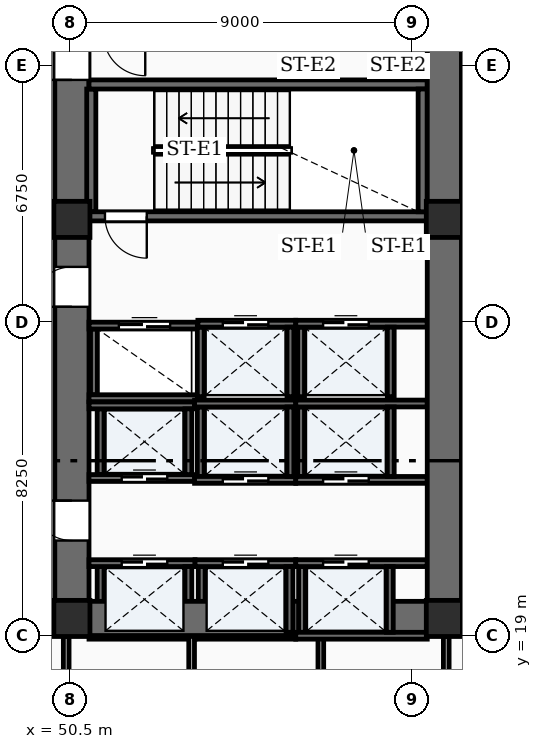
"""IFC4 building model, lengths in metres.
Left out: names, types, materials, properties, quantities, classifications, styles, units other than length and angle.
Written with IfcOpenShell. Run it as: python <this file> out.ifc"""

import sys

from ifc_helpers import new_model, si_unit, direction, frame, frame_2d, origin, origin_2d, place, context, subcontext, project, spatial, rectangle, extrude, element, fill, save


model = new_model("IFC4")
c1 = context("Model", 3, precision=1e-05, world=origin(), true_north=direction((0.0, 1.0)))
c2 = subcontext(c1, "Body", "Model", "MODEL_VIEW")
j1 = project(units=[si_unit("LENGTHUNIT", "METRE"), si_unit("PLANEANGLEUNIT", "RADIAN")], contexts=[c1])
p1 = place(None, origin())
s1 = spatial("IfcSite", under=j1, at=p1, CompositionType="ELEMENT")
p2 = place(p1, origin())
s2 = spatial("IfcBuilding", under=s1, at=p2, CompositionType="ELEMENT")
p3 = place(p2, origin())
s3 = spatial("IfcBuildingStorey", under=s2, at=p3, CompositionType="ELEMENT", Elevation=0.0)
p4 = place(p3, frame((50.55, 19.0, -0.45), z_axis=(0.0, 0.0, 1.0), x_axis=(0.0, 1.0, 0.0)))
e1 = element("IfcWall", 1, at=p4, inside=s3, PredefinedType="SHEAR", context=c2, shape_type="SweptSolid", body=[
    extrude(rectangle(XDim=20.8, YDim=0.9, at=frame_2d((10.4, 0.0))), origin(), (0.0, 0.0, 1.0), 8.1),
])
p5 = place(p4, frame((2.5, 0.0, 0.45)))
e2 = element("IfcOpeningElement", 2, at=p5, cuts=e1, PredefinedType="OPENING", context=c2, shape_type="SweptSolid", body=[
    extrude(rectangle(XDim=1.05, YDim=2.15, at=frame_2d((0.525, 1.075))), frame((0.0, 0.46, 0.0), z_axis=(0.0, -1.0, 0.0), x_axis=(1.0, 0.0, 0.0)), (0.0, 0.0, 1.0), 0.92),
])
p6 = place(p4, frame((8.65, 0.0, 0.45)))
e3 = element("IfcOpeningElement", 3, at=p6, cuts=e1, PredefinedType="OPENING", context=c2, shape_type="SweptSolid", body=[
    extrude(rectangle(XDim=1.05, YDim=2.15, at=frame_2d((0.525, 1.075))), frame((0.0, 0.46, 0.0), z_axis=(0.0, -1.0, 0.0), x_axis=(1.0, 0.0, 0.0)), (0.0, 0.0, 1.0), 0.92),
])
p7 = place(p4, frame((14.62, 0.0, 0.45)))
e4 = element("IfcOpeningElement", 4, at=p7, cuts=e1, PredefinedType="OPENING", context=c2, shape_type="SweptSolid", body=[
    extrude(rectangle(XDim=1.1, YDim=2.15, at=frame_2d((0.55, 1.075))), frame((0.0, 0.46, 0.0), z_axis=(0.0, -1.0, 0.0), x_axis=(1.0, 0.0, 0.0)), (0.0, 0.0, 1.0), 0.92),
])
p8 = place(p3, frame((60.35, 19.0, -0.45), z_axis=(0.0, 0.0, 1.0), x_axis=(0.0, 1.0, 0.0)))
e5 = element("IfcWall", 5, at=p8, inside=s3, PredefinedType="SHEAR", context=c2, shape_type="SweptSolid", body=[
    extrude(rectangle(XDim=20.8, YDim=0.9, at=frame_2d((10.4, 0.0))), origin(), (0.0, 0.0, 1.0), 8.1),
])
p9 = place(p3, frame((51.0, 19.45, -0.45), z_axis=(0.0, 0.0, 1.0), x_axis=(1.0, 0.0, 0.0)))
e6 = element("IfcWall", 6, at=p9, inside=s3, PredefinedType="SHEAR", context=c2, shape_type="SweptSolid", body=[
    extrude(rectangle(XDim=8.9, YDim=0.9, at=frame_2d((4.45, 0.0))), origin(), (0.0, 0.0, 1.0), 8.1),
])
for number, where, z_axis, x_axis in (
    (7, (50.55, 19.45, -0.45), (0.0, 0.0, 1.0), (1.0, 0.0, 0.0)),
    (8, (60.35, 19.45, -0.45), (0.0, 0.0, 1.0), (1.0, 0.0, 0.0)),
    (9, (50.55, 29.95, -0.45), (0.0, 0.0, 1.0), (1.0, 0.0, 0.0)),
    (10, (60.35, 29.95, -0.45), (0.0, 0.0, 1.0), (1.0, 0.0, 0.0)),
):
    element("IfcColumn", number, at=place(p3, frame(where, z_axis=z_axis, x_axis=x_axis)), inside=s3, PredefinedType="COLUMN", context=c2, shape_type="SweptSolid", body=[
        extrude(rectangle(XDim=0.95, YDim=0.95, at=origin_2d()), origin(), (0.0, 0.0, 1.0), 8.1),
    ])
p10 = place(p3, frame((59.9, 30.03, 0.0), z_axis=(0.0, 0.0, 1.0), x_axis=(-1.0, 0.0, 0.0)))
e11 = element("IfcWall", 11, at=p10, inside=s3, PredefinedType="SOLIDWALL", context=c2, shape_type="SweptSolid", body=[
    extrude(rectangle(XDim=8.9, YDim=0.24, at=frame_2d((4.45, 0.0))), origin(), (0.0, 0.0, 1.0), 7.65),
])
p11 = place(p10, frame((7.38, 0.0, 0.0)))
e12 = element("IfcOpeningElement", 12, at=p11, cuts=e11, PredefinedType="OPENING", context=c2, shape_type="SweptSolid", body=[
    extrude(rectangle(XDim=1.1, YDim=2.15, at=frame_2d((0.55, 1.075))), frame((0.0, 0.13, 0.0), z_axis=(0.0, -1.0, 0.0), x_axis=(1.0, 0.0, 0.0)), (0.0, 0.0, 1.0), 0.26),
])
p12 = place(p3, frame((51.0, 33.5, 0.0), z_axis=(0.0, 0.0, 1.0), x_axis=(1.0, 0.0, 0.0)))
e13 = element("IfcWall", 13, at=p12, inside=s3, PredefinedType="SOLIDWALL", context=c2, shape_type="SweptSolid", body=[
    extrude(rectangle(XDim=8.9, YDim=0.24, at=frame_2d((4.45, 0.0))), origin(), (0.0, 0.0, 1.0), 7.65),
])
for number, where, z_axis, x_axis in (
    (14, (51.06, 30.15, 0.0), (0.0, 0.0, 1.0), (0.0, 1.0, 0.0)),
    (15, (59.78, 30.15, 0.0), (0.0, 0.0, 1.0), (0.0, 1.0, 0.0)),
):
    element("IfcWall", number, at=place(p3, frame(where, z_axis=z_axis, x_axis=x_axis)), inside=s3, PredefinedType="SOLIDWALL", context=c2, shape_type="SweptSolid", body=[
        extrude(rectangle(XDim=3.23, YDim=0.24, at=frame_2d((1.615, 0.0))), origin(), (0.0, 0.0, 1.0), 7.65),
    ])
p13 = place(p3, frame((51.0, 20.905, 0.0), z_axis=(0.0, 0.0, 1.0), x_axis=(1.0, 0.0, 0.0)))
e16 = element("IfcWall", 16, at=p13, inside=s3, PredefinedType="SOLIDWALL", context=c2, shape_type="SweptSolid", body=[
    extrude(rectangle(XDim=2.79, YDim=0.18, at=frame_2d((1.395, 0.0))), origin(), (0.0, 0.0, 1.0), 7.65),
])
p14 = place(p13, frame((0.86, 0.0, 0.0)))
e17 = element("IfcOpeningElement", 17, at=p14, cuts=e16, PredefinedType="OPENING", context=c2, shape_type="SweptSolid", body=[
    extrude(rectangle(XDim=1.2, YDim=2.2, at=frame_2d((0.6, 1.1))), frame((0.0, 0.1, 0.0), z_axis=(0.0, -1.0, 0.0), x_axis=(1.0, 0.0, 0.0)), (0.0, 0.0, 1.0), 0.2),
])
p15 = place(p3, frame((51.0, 18.995, 0.0), z_axis=(0.0, 0.0, 1.0), x_axis=(1.0, 0.0, 0.0)))
e18 = element("IfcWall", 18, at=p15, inside=s3, PredefinedType="SOLIDWALL", context=c2, shape_type="SweptSolid", body=[
    extrude(rectangle(XDim=2.79, YDim=0.18, at=frame_2d((1.395, 0.0))), origin(), (0.0, 0.0, 1.0), 7.65),
])
for number, where, z_axis, x_axis in (
    (19, (51.305, 19.085, 0.0), (0.0, 0.0, 1.0), (0.0, 1.0, 0.0)),
    (20, (53.615, 19.085, 0.0), (0.0, 0.0, 1.0), (0.0, 1.0, 0.0)),
):
    element("IfcWall", number, at=place(p3, frame(where, z_axis=z_axis, x_axis=x_axis)), inside=s3, PredefinedType="SOLIDWALL", context=c2, shape_type="SweptSolid", body=[
        extrude(rectangle(XDim=1.73, YDim=0.18, at=frame_2d((0.865, 0.0))), origin(), (0.0, 0.0, 1.0), 7.65),
    ])
p16 = place(p3, frame((53.79, 20.905, 0.0), z_axis=(0.0, 0.0, 1.0), x_axis=(1.0, 0.0, 0.0)))
e21 = element("IfcWall", 21, at=p16, inside=s3, PredefinedType="SOLIDWALL", context=c2, shape_type="SweptSolid", body=[
    extrude(rectangle(XDim=2.65, YDim=0.18, at=frame_2d((1.325, 0.0))), origin(), (0.0, 0.0, 1.0), 7.65),
])
p17 = place(p16, frame((0.73, 0.0, 0.0)))
e22 = element("IfcOpeningElement", 22, at=p17, cuts=e21, PredefinedType="OPENING", context=c2, shape_type="SweptSolid", body=[
    extrude(rectangle(XDim=1.2, YDim=2.2, at=frame_2d((0.6, 1.1))), frame((0.0, 0.1, 0.0), z_axis=(0.0, -1.0, 0.0), x_axis=(1.0, 0.0, 0.0)), (0.0, 0.0, 1.0), 0.2),
])
p18 = place(p3, frame((53.79, 18.995, 0.0), z_axis=(0.0, 0.0, 1.0), x_axis=(1.0, 0.0, 0.0)))
e23 = element("IfcWall", 23, at=p18, inside=s3, PredefinedType="SOLIDWALL", context=c2, shape_type="SweptSolid", body=[
    extrude(rectangle(XDim=2.65, YDim=0.18, at=frame_2d((1.325, 0.0))), origin(), (0.0, 0.0, 1.0), 7.65),
])
for number, where, z_axis, x_axis in (
    (24, (53.965, 19.085, 0.0), (0.0, 0.0, 1.0), (0.0, 1.0, 0.0)),
    (25, (56.275, 19.085, 0.0), (0.0, 0.0, 1.0), (0.0, 1.0, 0.0)),
):
    element("IfcWall", number, at=place(p3, frame(where, z_axis=z_axis, x_axis=x_axis)), inside=s3, PredefinedType="SOLIDWALL", context=c2, shape_type="SweptSolid", body=[
        extrude(rectangle(XDim=1.73, YDim=0.18, at=frame_2d((0.865, 0.0))), origin(), (0.0, 0.0, 1.0), 7.65),
    ])
p19 = place(p3, frame((56.44, 20.905, 0.0), z_axis=(0.0, 0.0, 1.0), x_axis=(1.0, 0.0, 0.0)))
e26 = element("IfcWall", 26, at=p19, inside=s3, PredefinedType="SOLIDWALL", context=c2, shape_type="SweptSolid", body=[
    extrude(rectangle(XDim=3.46, YDim=0.18, at=frame_2d((1.73, 0.0))), origin(), (0.0, 0.0, 1.0), 7.65),
])
p20 = place(p19, frame((0.72, 0.0, 0.0)))
e27 = element("IfcOpeningElement", 27, at=p20, cuts=e26, PredefinedType="OPENING", context=c2, shape_type="SweptSolid", body=[
    extrude(rectangle(XDim=1.2, YDim=2.2, at=frame_2d((0.6, 1.1))), frame((0.0, 0.1, 0.0), z_axis=(0.0, -1.0, 0.0), x_axis=(1.0, 0.0, 0.0)), (0.0, 0.0, 1.0), 0.2),
])
p21 = place(p3, frame((56.44, 18.995, 0.0), z_axis=(0.0, 0.0, 1.0), x_axis=(1.0, 0.0, 0.0)))
e28 = element("IfcWall", 28, at=p21, inside=s3, PredefinedType="SOLIDWALL", context=c2, shape_type="SweptSolid", body=[
    extrude(rectangle(XDim=3.46, YDim=0.18, at=frame_2d((1.73, 0.0))), origin(), (0.0, 0.0, 1.0), 7.65),
])
for number, where, z_axis, x_axis in (
    (29, (56.605, 19.085, 0.0), (0.0, 0.0, 1.0), (0.0, 1.0, 0.0)),
    (30, (58.915, 19.085, 0.0), (0.0, 0.0, 1.0), (0.0, 1.0, 0.0)),
):
    element("IfcWall", number, at=place(p3, frame(where, z_axis=z_axis, x_axis=x_axis)), inside=s3, PredefinedType="SOLIDWALL", context=c2, shape_type="SweptSolid", body=[
        extrude(rectangle(XDim=1.73, YDim=0.18, at=frame_2d((0.865, 0.0))), origin(), (0.0, 0.0, 1.0), 7.65),
    ])
p22 = place(p3, frame((51.0, 25.055, 0.0), z_axis=(0.0, 0.0, 1.0), x_axis=(1.0, 0.0, 0.0)))
e31 = element("IfcWall", 31, at=p22, inside=s3, PredefinedType="SOLIDWALL", context=c2, shape_type="SweptSolid", body=[
    extrude(rectangle(XDim=2.778, YDim=0.18, at=frame_2d((1.389, 0.0))), origin(), (0.0, 0.0, 1.0), 7.65),
])
p23 = place(p3, frame((51.0, 23.145, 0.0), z_axis=(0.0, 0.0, 1.0), x_axis=(1.0, 0.0, 0.0)))
e32 = element("IfcWall", 32, at=p23, inside=s3, PredefinedType="SOLIDWALL", context=c2, shape_type="SweptSolid", body=[
    extrude(rectangle(XDim=2.778, YDim=0.18, at=frame_2d((1.389, 0.0))), origin(), (0.0, 0.0, 1.0), 7.65),
])
p24 = place(p23, frame((0.86, 0.0, 0.0)))
e33 = element("IfcOpeningElement", 33, at=p24, cuts=e32, PredefinedType="OPENING", context=c2, shape_type="SweptSolid", body=[
    extrude(rectangle(XDim=1.2, YDim=2.2, at=frame_2d((0.6, 1.1))), frame((0.0, 0.1, 0.0), z_axis=(0.0, -1.0, 0.0), x_axis=(1.0, 0.0, 0.0)), (0.0, 0.0, 1.0), 0.2),
])
for number, where, z_axis, x_axis in (
    (34, (51.305, 23.235, 0.0), (0.0, 0.0, 1.0), (0.0, 1.0, 0.0)),
    (35, (53.615, 23.235, 0.0), (0.0, 0.0, 1.0), (0.0, 1.0, 0.0)),
):
    element("IfcWall", number, at=place(p3, frame(where, z_axis=z_axis, x_axis=x_axis)), inside=s3, PredefinedType="SOLIDWALL", context=c2, shape_type="SweptSolid", body=[
        extrude(rectangle(XDim=1.73, YDim=0.18, at=frame_2d((0.865, 0.0))), origin(), (0.0, 0.0, 1.0), 7.65),
    ])
p25 = place(p3, frame((53.778, 25.105, 0.0), z_axis=(0.0, 0.0, 1.0), x_axis=(1.0, 0.0, 0.0)))
e36 = element("IfcWall", 36, at=p25, inside=s3, PredefinedType="SOLIDWALL", context=c2, shape_type="SweptSolid", body=[
    extrude(rectangle(XDim=2.662, YDim=0.18, at=frame_2d((1.331, 0.0))), origin(), (0.0, 0.0, 1.0), 7.65),
])
p26 = place(p3, frame((53.778, 23.095, 0.0), z_axis=(0.0, 0.0, 1.0), x_axis=(1.0, 0.0, 0.0)))
e37 = element("IfcWall", 37, at=p26, inside=s3, PredefinedType="SOLIDWALL", context=c2, shape_type="SweptSolid", body=[
    extrude(rectangle(XDim=2.662, YDim=0.18, at=frame_2d((1.331, 0.0))), origin(), (0.0, 0.0, 1.0), 7.65),
])
p27 = place(p26, frame((0.742, 0.0, 0.0)))
e38 = element("IfcOpeningElement", 38, at=p27, cuts=e37, PredefinedType="OPENING", context=c2, shape_type="SweptSolid", body=[
    extrude(rectangle(XDim=1.2, YDim=2.2, at=frame_2d((0.6, 1.1))), frame((0.0, 0.1, 0.0), z_axis=(0.0, -1.0, 0.0), x_axis=(1.0, 0.0, 0.0)), (0.0, 0.0, 1.0), 0.2),
])
for number, where, z_axis, x_axis in (
    (39, (53.94, 23.185, 0.0), (0.0, 0.0, 1.0), (0.0, 1.0, 0.0)),
    (40, (56.3, 23.185, 0.0), (0.0, 0.0, 1.0), (0.0, 1.0, 0.0)),
):
    element("IfcWall", number, at=place(p3, frame(where, z_axis=z_axis, x_axis=x_axis)), inside=s3, PredefinedType="SOLIDWALL", context=c2, shape_type="SweptSolid", body=[
        extrude(rectangle(XDim=1.83, YDim=0.18, at=frame_2d((0.915, 0.0))), origin(), (0.0, 0.0, 1.0), 7.65),
    ])
p28 = place(p3, frame((56.44, 25.105, 0.0), z_axis=(0.0, 0.0, 1.0), x_axis=(1.0, 0.0, 0.0)))
e41 = element("IfcWall", 41, at=p28, inside=s3, PredefinedType="SOLIDWALL", context=c2, shape_type="SweptSolid", body=[
    extrude(rectangle(XDim=3.46, YDim=0.18, at=frame_2d((1.73, 0.0))), origin(), (0.0, 0.0, 1.0), 7.65),
])
p29 = place(p3, frame((56.44, 23.095, 0.0), z_axis=(0.0, 0.0, 1.0), x_axis=(1.0, 0.0, 0.0)))
e42 = element("IfcWall", 42, at=p29, inside=s3, PredefinedType="SOLIDWALL", context=c2, shape_type="SweptSolid", body=[
    extrude(rectangle(XDim=3.46, YDim=0.18, at=frame_2d((1.73, 0.0))), origin(), (0.0, 0.0, 1.0), 7.65),
])
p30 = place(p29, frame((0.72, 0.0, 0.0)))
e43 = element("IfcOpeningElement", 43, at=p30, cuts=e42, PredefinedType="OPENING", context=c2, shape_type="SweptSolid", body=[
    extrude(rectangle(XDim=1.2, YDim=2.2, at=frame_2d((0.6, 1.1))), frame((0.0, 0.1, 0.0), z_axis=(0.0, -1.0, 0.0), x_axis=(1.0, 0.0, 0.0)), (0.0, 0.0, 1.0), 0.2),
])
for number, where, z_axis, x_axis in (
    (44, (56.58, 23.185, 0.0), (0.0, 0.0, 1.0), (0.0, 1.0, 0.0)),
    (45, (58.94, 23.185, 0.0), (0.0, 0.0, 1.0), (0.0, 1.0, 0.0)),
):
    element("IfcWall", number, at=place(p3, frame(where, z_axis=z_axis, x_axis=x_axis)), inside=s3, PredefinedType="SOLIDWALL", context=c2, shape_type="SweptSolid", body=[
        extrude(rectangle(XDim=1.83, YDim=0.18, at=frame_2d((0.915, 0.0))), origin(), (0.0, 0.0, 1.0), 7.65),
    ])
p31 = place(p3, frame((53.865, 27.205, 0.0), z_axis=(0.0, 0.0, 1.0), x_axis=(1.0, 0.0, 0.0)))
e46 = element("IfcWall", 46, at=p31, inside=s3, PredefinedType="SOLIDWALL", context=c2, shape_type="SweptSolid", body=[
    extrude(rectangle(XDim=2.575, YDim=0.18, at=frame_2d((1.288, 0.0))), origin(), (0.0, 0.0, 1.0), 7.65),
])
p32 = place(p31, frame((0.655, 0.0, 0.0)))
e47 = element("IfcOpeningElement", 47, at=p32, cuts=e46, PredefinedType="OPENING", context=c2, shape_type="SweptSolid", body=[
    extrude(rectangle(XDim=1.2, YDim=2.2, at=frame_2d((0.6, 1.1))), frame((0.0, 0.1, 0.0), z_axis=(0.0, -1.0, 0.0), x_axis=(1.0, 0.0, 0.0)), (0.0, 0.0, 1.0), 0.2),
])
for number, where, z_axis, x_axis in (
    (48, (53.94, 25.285, 0.0), (0.0, 0.0, 1.0), (0.0, 1.0, 0.0)),
    (49, (56.3, 25.285, 0.0), (0.0, 0.0, 1.0), (0.0, 1.0, 0.0)),
):
    element("IfcWall", number, at=place(p3, frame(where, z_axis=z_axis, x_axis=x_axis)), inside=s3, PredefinedType="SOLIDWALL", context=c2, shape_type="SweptSolid", body=[
        extrude(rectangle(XDim=1.83, YDim=0.18, at=frame_2d((0.915, 0.0))), origin(), (0.0, 0.0, 1.0), 7.65),
    ])
p33 = place(p3, frame((56.44, 27.205, 0.0), z_axis=(0.0, 0.0, 1.0), x_axis=(1.0, 0.0, 0.0)))
e50 = element("IfcWall", 50, at=p33, inside=s3, PredefinedType="SOLIDWALL", context=c2, shape_type="SweptSolid", body=[
    extrude(rectangle(XDim=3.46, YDim=0.18, at=frame_2d((1.73, 0.0))), origin(), (0.0, 0.0, 1.0), 7.65),
])
p34 = place(p33, frame((0.72, 0.0, 0.0)))
e51 = element("IfcOpeningElement", 51, at=p34, cuts=e50, PredefinedType="OPENING", context=c2, shape_type="SweptSolid", body=[
    extrude(rectangle(XDim=1.2, YDim=2.2, at=frame_2d((0.6, 1.1))), frame((0.0, 0.1, 0.0), z_axis=(0.0, -1.0, 0.0), x_axis=(1.0, 0.0, 0.0)), (0.0, 0.0, 1.0), 0.2),
])
for number, where, z_axis, x_axis in (
    (52, (56.58, 25.285, 0.0), (0.0, 0.0, 1.0), (0.0, 1.0, 0.0)),
    (53, (58.94, 25.285, 0.0), (0.0, 0.0, 1.0), (0.0, 1.0, 0.0)),
):
    element("IfcWall", number, at=place(p3, frame(where, z_axis=z_axis, x_axis=x_axis)), inside=s3, PredefinedType="SOLIDWALL", context=c2, shape_type="SweptSolid", body=[
        extrude(rectangle(XDim=1.83, YDim=0.18, at=frame_2d((0.915, 0.0))), origin(), (0.0, 0.0, 1.0), 7.65),
    ])
p35 = place(p3, frame((51.0, 27.155, 0.0), z_axis=(0.0, 0.0, 1.0), x_axis=(1.0, 0.0, 0.0)))
e54 = element("IfcWall", 54, at=p35, inside=s3, PredefinedType="SOLIDWALL", context=c2, shape_type="SweptSolid", body=[
    extrude(rectangle(XDim=2.865, YDim=0.18, at=frame_2d((1.433, 0.0))), origin(), (0.0, 0.0, 1.0), 7.65),
])
p36 = place(p35, frame((0.785, 0.0, 0.0)))
e55 = element("IfcOpeningElement", 55, at=p36, cuts=e54, PredefinedType="OPENING", context=c2, shape_type="SweptSolid", body=[
    extrude(rectangle(XDim=1.35, YDim=2.3, at=frame_2d((0.675, 1.15))), frame((0.0, 0.1, 0.0), z_axis=(0.0, -1.0, 0.0), x_axis=(1.0, 0.0, 0.0)), (0.0, 0.0, 1.0), 0.2),
])
p37 = place(p3, frame((51.0, 25.245, 0.0), z_axis=(0.0, 0.0, 1.0), x_axis=(1.0, 0.0, 0.0)))
e56 = element("IfcWall", 56, at=p37, inside=s3, PredefinedType="SOLIDWALL", context=c2, shape_type="SweptSolid", body=[
    extrude(rectangle(XDim=2.865, YDim=0.18, at=frame_2d((1.433, 0.0))), origin(), (0.0, 0.0, 1.0), 7.65),
])
p38 = place(p3, frame((51.13, 25.335, 0.0), z_axis=(0.0, 0.0, 1.0), x_axis=(0.0, 1.0, 0.0)))
e57 = element("IfcWall", 57, at=p38, inside=s3, PredefinedType="SOLIDWALL", context=c2, shape_type="SweptSolid", body=[
    extrude(rectangle(XDim=1.73, YDim=0.18, at=frame_2d((0.865, 0.0))), origin(), (0.0, 0.0, 1.0), 7.65),
])
for number, where, z_axis, x_axis in (
    (58, (53.7, 15.4, 0.0), (0.0, 0.0, 1.0), (0.0, 1.0, 0.0)),
    (59, (57.1, 15.4, 0.0), (0.0, 0.0, 1.0), (0.0, 1.0, 0.0)),
    (60, (50.4, 15.4, 0.0), (0.0, 0.0, 1.0), (0.0, 1.0, 0.0)),
    (61, (60.4, 15.4, 0.0), (0.0, 0.0, 1.0), (0.0, 1.0, 0.0)),
):
    element("IfcWall", number, at=place(p3, frame(where, z_axis=z_axis, x_axis=x_axis)), inside=s3, PredefinedType="PARTITIONING", context=c2, shape_type="SweptSolid", body=[
        extrude(rectangle(XDim=3.58, YDim=0.15, at=frame_2d((1.79, 0.0))), origin(), (0.0, 0.0, 1.0), 6.71),
    ])
p39 = place(p5, origin())
e62 = element("IfcDoor", 62, at=p39, inside=s3, OperationType="SINGLE_SWING_RIGHT", PredefinedType="DOOR", context=c2, shape_type="SweptSolid", body=[
    extrude(rectangle(XDim=1.05, YDim=2.15, at=frame_2d((0.525, 1.075))), frame((0.0, 0.025, 0.0), z_axis=(0.0, -1.0, 0.0), x_axis=(1.0, 0.0, 0.0)), (0.0, 0.0, 1.0), 0.05),
])
fill(e2, e62)
p40 = place(p6, origin())
e63 = element("IfcDoor", 63, at=p40, inside=s3, OperationType="SINGLE_SWING_LEFT", PredefinedType="DOOR", context=c2, shape_type="SweptSolid", body=[
    extrude(rectangle(XDim=1.05, YDim=2.15, at=frame_2d((0.525, 1.075))), frame((0.0, 0.025, 0.0), z_axis=(0.0, -1.0, 0.0), x_axis=(1.0, 0.0, 0.0)), (0.0, 0.0, 1.0), 0.05),
])
fill(e3, e63)
p41 = place(p7, origin())
e64 = element("IfcDoor", 64, at=p41, inside=s3, OperationType="SINGLE_SWING_LEFT", PredefinedType="DOOR", context=c2, shape_type="SweptSolid", body=[
    extrude(rectangle(XDim=1.1, YDim=2.15, at=frame_2d((0.55, 1.075))), frame((0.0, 0.025, 0.0), z_axis=(0.0, -1.0, 0.0), x_axis=(1.0, 0.0, 0.0)), (0.0, 0.0, 1.0), 0.05),
])
fill(e4, e64)
p42 = place(p11, origin())
e65 = element("IfcDoor", 65, at=p42, inside=s3, OperationType="SINGLE_SWING_LEFT", PredefinedType="DOOR", context=c2, shape_type="SweptSolid", body=[
    extrude(rectangle(XDim=1.1, YDim=2.15, at=frame_2d((0.55, 1.075))), frame((0.0, 0.025, 0.0), z_axis=(0.0, -1.0, 0.0), x_axis=(1.0, 0.0, 0.0)), (0.0, 0.0, 1.0), 0.05),
])
fill(e12, e65)
p43 = place(p14, origin())
e66 = element("IfcDoor", 66, at=p43, inside=s3, OperationType="DOUBLE_DOOR_SLIDING", PredefinedType="DOOR", context=c2, shape_type="SweptSolid", body=[
    extrude(rectangle(XDim=1.2, YDim=2.2, at=frame_2d((0.6, 1.1))), frame((0.0, 0.025, 0.0), z_axis=(0.0, -1.0, 0.0), x_axis=(1.0, 0.0, 0.0)), (0.0, 0.0, 1.0), 0.05),
])
fill(e17, e66)
p44 = place(p17, origin())
e67 = element("IfcDoor", 67, at=p44, inside=s3, OperationType="DOUBLE_DOOR_SLIDING", PredefinedType="DOOR", context=c2, shape_type="SweptSolid", body=[
    extrude(rectangle(XDim=1.2, YDim=2.2, at=frame_2d((0.6, 1.1))), frame((0.0, 0.025, 0.0), z_axis=(0.0, -1.0, 0.0), x_axis=(1.0, 0.0, 0.0)), (0.0, 0.0, 1.0), 0.05),
])
fill(e22, e67)
p45 = place(p20, origin())
e68 = element("IfcDoor", 68, at=p45, inside=s3, OperationType="DOUBLE_DOOR_SLIDING", PredefinedType="DOOR", context=c2, shape_type="SweptSolid", body=[
    extrude(rectangle(XDim=1.2, YDim=2.2, at=frame_2d((0.6, 1.1))), frame((0.0, 0.025, 0.0), z_axis=(0.0, -1.0, 0.0), x_axis=(1.0, 0.0, 0.0)), (0.0, 0.0, 1.0), 0.05),
])
fill(e27, e68)
p46 = place(p24, origin())
e69 = element("IfcDoor", 69, at=p46, inside=s3, OperationType="DOUBLE_DOOR_SLIDING", PredefinedType="DOOR", context=c2, shape_type="SweptSolid", body=[
    extrude(rectangle(XDim=1.2, YDim=2.2, at=frame_2d((0.6, 1.1))), frame((0.0, 0.025, 0.0), z_axis=(0.0, -1.0, 0.0), x_axis=(1.0, 0.0, 0.0)), (0.0, 0.0, 1.0), 0.05),
])
fill(e33, e69)
p47 = place(p27, origin())
e70 = element("IfcDoor", 70, at=p47, inside=s3, OperationType="DOUBLE_DOOR_SLIDING", PredefinedType="DOOR", context=c2, shape_type="SweptSolid", body=[
    extrude(rectangle(XDim=1.2, YDim=2.2, at=frame_2d((0.6, 1.1))), frame((0.0, 0.025, 0.0), z_axis=(0.0, -1.0, 0.0), x_axis=(1.0, 0.0, 0.0)), (0.0, 0.0, 1.0), 0.05),
])
fill(e38, e70)
p48 = place(p30, origin())
e71 = element("IfcDoor", 71, at=p48, inside=s3, OperationType="DOUBLE_DOOR_SLIDING", PredefinedType="DOOR", context=c2, shape_type="SweptSolid", body=[
    extrude(rectangle(XDim=1.2, YDim=2.2, at=frame_2d((0.6, 1.1))), frame((0.0, 0.025, 0.0), z_axis=(0.0, -1.0, 0.0), x_axis=(1.0, 0.0, 0.0)), (0.0, 0.0, 1.0), 0.05),
])
fill(e43, e71)
p49 = place(p32, origin())
e72 = element("IfcDoor", 72, at=p49, inside=s3, OperationType="DOUBLE_DOOR_SLIDING", PredefinedType="DOOR", context=c2, shape_type="SweptSolid", body=[
    extrude(rectangle(XDim=1.2, YDim=2.2, at=frame_2d((0.6, 1.1))), frame((0.0, 0.025, 0.0), z_axis=(0.0, -1.0, 0.0), x_axis=(1.0, 0.0, 0.0)), (0.0, 0.0, 1.0), 0.05),
])
fill(e47, e72)
p50 = place(p34, origin())
e73 = element("IfcDoor", 73, at=p50, inside=s3, OperationType="DOUBLE_DOOR_SLIDING", PredefinedType="DOOR", context=c2, shape_type="SweptSolid", body=[
    extrude(rectangle(XDim=1.2, YDim=2.2, at=frame_2d((0.6, 1.1))), frame((0.0, 0.025, 0.0), z_axis=(0.0, -1.0, 0.0), x_axis=(1.0, 0.0, 0.0)), (0.0, 0.0, 1.0), 0.05),
])
fill(e51, e73)
p51 = place(p36, origin())
e74 = element("IfcDoor", 74, at=p51, inside=s3, OperationType="DOUBLE_DOOR_SLIDING", PredefinedType="DOOR", context=c2, shape_type="SweptSolid", body=[
    extrude(rectangle(XDim=1.35, YDim=2.3, at=frame_2d((0.675, 1.15))), frame((0.0, 0.025, 0.0), z_axis=(0.0, -1.0, 0.0), x_axis=(1.0, 0.0, 0.0)), (0.0, 0.0, 1.0), 0.05),
])
fill(e55, e74)
save(model, sys.argv[1])
